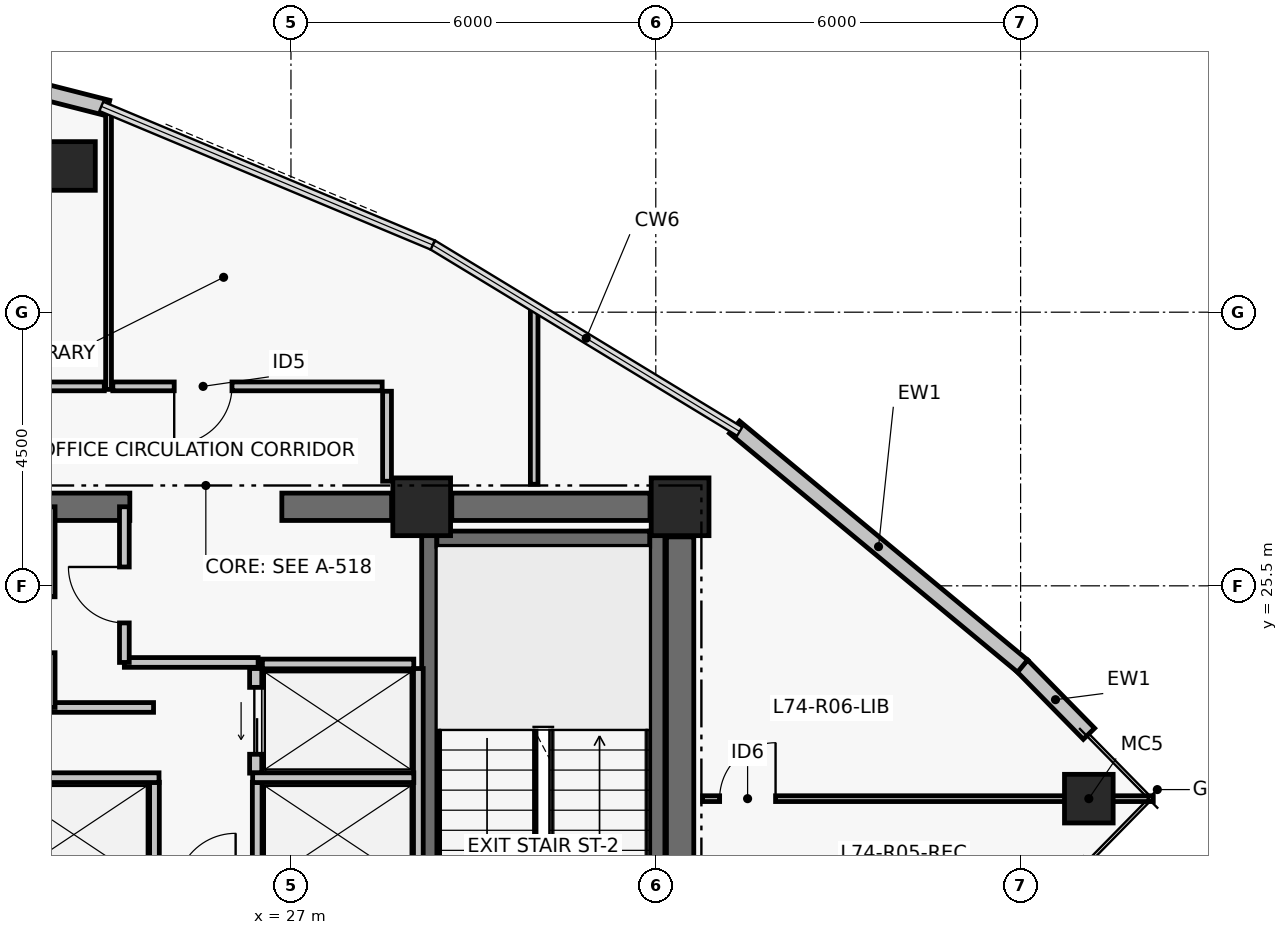
"""IFC4 building model, lengths in metres.
Left out: names, types, materials, properties, quantities, classifications, styles, units other than length and angle.
Written with IfcOpenShell. Run it as: python <this file> out.ifc"""

import sys

from ifc_helpers import new_model, si_unit, direction, frame, frame_2d, origin, origin_2d, place, context, subcontext, project, spatial, rectangle, hollow_rectangle, extrude, element, fill, save


model = new_model("IFC4")
c1 = context("Model", 3, precision=1e-05, world=origin(), true_north=direction((0.0, 1.0)))
c2 = subcontext(c1, "Body", "Model", "MODEL_VIEW")
j1 = project(units=[si_unit("LENGTHUNIT", "METRE"), si_unit("PLANEANGLEUNIT", "RADIAN")], contexts=[c1])
p1 = place(None, origin())
s1 = spatial("IfcSite", under=j1, at=p1, CompositionType="ELEMENT")
p2 = place(p1, origin())
s2 = spatial("IfcBuilding", under=s1, at=p2, CompositionType="ELEMENT")
p3 = place(p2, frame((0.0, 0.0, 291.78)))
s3 = spatial("IfcBuildingStorey", under=s2, at=p3, CompositionType="ELEMENT", Elevation=291.78)
for number, where, z_axis, x_axis in (
    (1, (29.15, 26.8, 0.0), (0.0, 0.0, 1.0), (1.0, 0.0, 0.0)),
    (2, (33.4, 26.8, 0.0), (0.0, 0.0, 1.0), (1.0, 0.0, 0.0)),
):
    element("IfcColumn", number, at=place(p3, frame(where, z_axis=z_axis, x_axis=x_axis)), inside=s3, PredefinedType="COLUMN", context=c2, shape_type="SweptSolid", body=[
        extrude(rectangle(XDim=0.95, YDim=0.95, at=origin_2d()), origin(), (0.0, 0.0, 1.0), 3.72),
    ])
p4 = place(p3, frame((22.545, 26.8, 0.0), z_axis=(0.0, 0.0, 1.0), x_axis=(1.0, 0.0, 0.0)))
e3 = element("IfcWall", 3, at=p4, inside=s3, PredefinedType="SHEAR", context=c2, shape_type="SweptSolid", body=[
    extrude(rectangle(XDim=1.805, YDim=0.45, at=frame_2d((0.903, 0.0))), origin(), (0.0, 0.0, 1.0), 3.5),
])
p5 = place(p3, frame((26.85, 26.8, 0.0), z_axis=(0.0, 0.0, 1.0), x_axis=(1.0, 0.0, 0.0)))
e4 = element("IfcWall", 4, at=p5, inside=s3, PredefinedType="SHEAR", context=c2, shape_type="SweptSolid", body=[
    extrude(rectangle(XDim=1.805, YDim=0.45, at=frame_2d((0.902, 0.0))), origin(), (0.0, 0.0, 1.0), 3.5),
])
p6 = place(p3, frame((29.645, 26.8, 0.0), z_axis=(0.0, 0.0, 1.0), x_axis=(1.0, 0.0, 0.0)))
e5 = element("IfcWall", 5, at=p6, inside=s3, PredefinedType="SHEAR", context=c2, shape_type="SweptSolid", body=[
    extrude(rectangle(XDim=3.26, YDim=0.45, at=frame_2d((1.63, 0.0))), origin(), (0.0, 0.0, 1.0), 3.5),
])
p7 = place(p3, frame((33.4, 17.695, 0.0), z_axis=(0.0, 0.0, 1.0), x_axis=(0.0, 1.0, 0.0)))
e6 = element("IfcWall", 6, at=p7, inside=s3, PredefinedType="SHEAR", context=c2, shape_type="SweptSolid", body=[
    extrude(rectangle(XDim=8.61, YDim=0.45, at=frame_2d((4.305, 0.0))), origin(), (0.0, 0.0, 1.0), 3.5),
])
p8 = place(p3, frame((29.275, 17.6, 0.0), z_axis=(0.0, 0.0, 1.0), x_axis=(0.0, 1.0, 0.0)))
e7 = element("IfcWall", 7, at=p8, inside=s3, PredefinedType="SHEAR", context=c2, shape_type="SweptSolid", body=[
    extrude(rectangle(XDim=8.8, YDim=0.25, at=frame_2d((4.4, 0.0))), origin(), (0.0, 0.0, 1.0), 3.5),
])
p9 = place(p8, frame((0.35, 0.0, 0.0)))
e8 = element("IfcOpeningElement", 8, at=p9, cuts=e7, PredefinedType="OPENING", context=c2, shape_type="SweptSolid", body=[
    extrude(rectangle(XDim=1.05, YDim=2.08, at=frame_2d((0.525, 1.04))), frame((0.0, 0.135, 0.0), z_axis=(0.0, -1.0, 0.0), x_axis=(1.0, 0.0, 0.0)), (0.0, 0.0, 1.0), 0.27),
])
p10 = place(p3, frame((33.025, 17.6, 0.0), z_axis=(0.0, 0.0, 1.0), x_axis=(0.0, 1.0, 0.0)))
e9 = element("IfcWall", 9, at=p10, inside=s3, PredefinedType="SHEAR", context=c2, shape_type="SweptSolid", body=[
    extrude(rectangle(XDim=8.8, YDim=0.25, at=frame_2d((4.4, 0.0))), origin(), (0.0, 0.0, 1.0), 3.5),
])
p11 = place(p3, frame((29.4, 26.275, 0.0), z_axis=(0.0, 0.0, 1.0), x_axis=(1.0, 0.0, 0.0)))
e10 = element("IfcWall", 10, at=p11, inside=s3, PredefinedType="SHEAR", context=c2, shape_type="SweptSolid", body=[
    extrude(rectangle(XDim=3.5, YDim=0.25, at=frame_2d((1.75, 0.0))), origin(), (0.0, 0.0, 1.0), 3.5),
])
for number, where, z_axis, x_axis in (
    (11, (40.122, 22.0, 0.0), (0.0, 0.0, 1.0), (1.0, 0.0, 0.0)),
    (12, (23.382, 32.405, 0.0), (0.0, 0.0, 1.0), (1.0, 0.0, 0.0)),
):
    element("IfcColumn", number, at=place(p3, frame(where, z_axis=z_axis, x_axis=x_axis)), inside=s3, PredefinedType="COLUMN", context=c2, shape_type="SweptSolid", body=[
        extrude(hollow_rectangle(XDim=0.8, YDim=0.8, WallThickness=0.035, at=origin_2d()), origin(), (0.0, 0.0, 1.0), 3.72),
    ])
p12 = place(p3, frame((39.024, 24.188, 0.0), z_axis=(0.0, 0.0, 1.0), x_axis=(0.700470648387, -0.71368121087, 0.0)))
e13 = element("IfcWall", 13, at=p12, inside=s3, PredefinedType="PARTITIONING", context=c2, shape_type="SweptSolid", body=[
    extrude(rectangle(XDim=1.571, YDim=0.26, at=frame_2d((0.785, 0.0))), origin(), (0.0, 0.0, 1.0), 3.5),
])
p13 = place(p3, frame((34.295, 28.108, 0.0), z_axis=(0.0, 0.0, 1.0), x_axis=(0.769779830138, -0.638309496337, 0.0)))
e14 = element("IfcWall", 14, at=p13, inside=s3, PredefinedType="PARTITIONING", context=c2, shape_type="SweptSolid", body=[
    extrude(rectangle(XDim=6.154, YDim=0.26, at=frame_2d((3.077, 0.0))), origin(), (0.0, 0.0, 1.0), 3.5),
])
p14 = place(p3, frame((18.024, 34.879, 0.0), z_axis=(0.0, 0.0, 1.0), x_axis=(0.968988278672, -0.247106689096, 0.0)))
e15 = element("IfcWall", 15, at=p14, inside=s3, PredefinedType="PARTITIONING", context=c2, shape_type="SweptSolid", body=[
    extrude(rectangle(XDim=6.154, YDim=0.26, at=frame_2d((3.077, 0.0))), origin(), (0.0, 0.0, 1.0), 3.5),
])
p15 = place(p3, frame((26.42, 22.42, 0.0), z_axis=(0.0, 0.0, 1.0), x_axis=(0.0, 1.0, 0.0)))
e16 = element("IfcWall", 16, at=p15, inside=s3, PredefinedType="PARTITIONING", context=c2, shape_type="SweptSolid", body=[
    extrude(rectangle(XDim=1.72, YDim=0.2, at=frame_2d((0.86, 0.0))), origin(), (0.0, 0.0, 1.0), 3.5),
])
p16 = place(p15, frame((0.31, 0.0, 0.0)))
e17 = element("IfcOpeningElement", 17, at=p16, cuts=e16, PredefinedType="OPENING", context=c2, shape_type="SweptSolid", body=[
    extrude(rectangle(XDim=1.1, YDim=2.08, at=frame_2d((0.55, 1.04))), frame((0.0, 0.11, 0.0), z_axis=(0.0, -1.0, 0.0), x_axis=(1.0, 0.0, 0.0)), (0.0, 0.0, 1.0), 0.22),
])
p17 = place(p3, frame((24.755, 20.56, 0.0), z_axis=(0.0, 0.0, 1.0), x_axis=(0.0, 1.0, 0.0)))
e18 = element("IfcWall", 18, at=p17, inside=s3, PredefinedType="PARTITIONING", context=c2, shape_type="SweptSolid", body=[
    extrude(rectangle(XDim=1.71, YDim=0.16, at=frame_2d((0.855, 0.0))), origin(), (0.0, 0.0, 1.0), 3.5),
])
p18 = place(p3, frame((22.18, 22.345, 0.0), z_axis=(0.0, 0.0, 1.0), x_axis=(1.0, 0.0, 0.0)))
e19 = element("IfcWall", 19, at=p18, inside=s3, PredefinedType="PARTITIONING", context=c2, shape_type="SweptSolid", body=[
    extrude(rectangle(XDim=2.65, YDim=0.16, at=frame_2d((1.325, 0.0))), origin(), (0.0, 0.0, 1.0), 3.5),
])
p19 = place(p3, frame((29.095, 20.56, 0.0), z_axis=(0.0, 0.0, 1.0), x_axis=(0.0, 1.0, 0.0)))
e20 = element("IfcWall", 20, at=p19, inside=s3, PredefinedType="PARTITIONING", context=c2, shape_type="SweptSolid", body=[
    extrude(rectangle(XDim=3.58, YDim=0.16, at=frame_2d((1.79, 0.0))), origin(), (0.0, 0.0, 1.0), 3.5),
])
p20 = place(p3, frame((26.445, 20.56, 0.0), z_axis=(0.0, 0.0, 1.0), x_axis=(0.0, 1.0, 0.0)))
e21 = element("IfcWall", 21, at=p20, inside=s3, PredefinedType="PARTITIONING", context=c2, shape_type="SweptSolid", body=[
    extrude(rectangle(XDim=1.71, YDim=0.16, at=frame_2d((0.855, 0.0))), origin(), (0.0, 0.0, 1.0), 3.5),
])
p21 = place(p3, frame((26.37, 22.345, 0.0), z_axis=(0.0, 0.0, 1.0), x_axis=(1.0, 0.0, 0.0)))
e22 = element("IfcWall", 22, at=p21, inside=s3, PredefinedType="PARTITIONING", context=c2, shape_type="SweptSolid", body=[
    extrude(rectangle(XDim=2.65, YDim=0.16, at=frame_2d((1.325, 0.0))), origin(), (0.0, 0.0, 1.0), 3.5),
])
p22 = place(p3, frame((26.53, 24.215, 0.0), z_axis=(0.0, 0.0, 1.0), x_axis=(1.0, 0.0, 0.0)))
e23 = element("IfcWall", 23, at=p22, inside=s3, PredefinedType="PARTITIONING", context=c2, shape_type="SweptSolid", body=[
    extrude(rectangle(XDim=2.49, YDim=0.16, at=frame_2d((1.245, 0.0))), origin(), (0.0, 0.0, 1.0), 3.5),
])
p23 = place(p3, frame((23.04, 23.5, 0.0), z_axis=(0.0, 0.0, 1.0), x_axis=(1.0, 0.0, 0.0)))
e24 = element("IfcWall", 24, at=p23, inside=s3, PredefinedType="PARTITIONING", context=c2, shape_type="SweptSolid", body=[
    extrude(rectangle(XDim=1.7, YDim=0.16, at=frame_2d((0.85, 0.0))), origin(), (0.0, 0.0, 1.0), 3.5),
])
p24 = place(p3, frame((23.04, 23.5, 0.0), z_axis=(0.0, 0.0, 1.0), x_axis=(0.0, 1.0, 0.0)))
e25 = element("IfcWall", 25, at=p24, inside=s3, PredefinedType="PARTITIONING", context=c2, shape_type="SweptSolid", body=[
    extrude(rectangle(XDim=3.3, YDim=0.16, at=frame_2d((1.65, 0.0))), origin(), (0.0, 0.0, 1.0), 2.63),
])
p25 = place(p24, frame((0.9, 0.0, 0.0)))
e26 = element("IfcOpeningElement", 26, at=p25, cuts=e25, PredefinedType="OPENING", context=c2, shape_type="SweptSolid", body=[
    extrude(rectangle(XDim=0.92, YDim=2.05, at=frame_2d((0.46, 1.025))), frame((0.0, 0.09, 0.0), z_axis=(0.0, -1.0, 0.0), x_axis=(1.0, 0.0, 0.0)), (0.0, 0.0, 1.0), 0.18),
])
p26 = place(p3, frame((24.26, 24.24, 0.0), z_axis=(0.0, 0.0, 1.0), x_axis=(1.0, 0.0, 0.0)))
e27 = element("IfcWall", 27, at=p26, inside=s3, PredefinedType="PARTITIONING", context=c2, shape_type="SweptSolid", body=[
    extrude(rectangle(XDim=2.2, YDim=0.16, at=frame_2d((1.1, 0.0))), origin(), (0.0, 0.0, 1.0), 3.5),
])
p27 = place(p3, frame((24.26, 24.24, 0.0), z_axis=(0.0, 0.0, 1.0), x_axis=(0.0, 1.0, 0.0)))
e28 = element("IfcWall", 28, at=p27, inside=s3, PredefinedType="PARTITIONING", context=c2, shape_type="SweptSolid", body=[
    extrude(rectangle(XDim=2.56, YDim=0.16, at=frame_2d((1.28, 0.0))), origin(), (0.0, 0.0, 1.0), 2.63),
])
p28 = place(p27, frame((0.65, 0.0, 0.0)))
e29 = element("IfcOpeningElement", 29, at=p28, cuts=e28, PredefinedType="OPENING", context=c2, shape_type="SweptSolid", body=[
    extrude(rectangle(XDim=0.92, YDim=2.05, at=frame_2d((0.46, 1.025))), frame((0.0, 0.09, 0.0), z_axis=(0.0, -1.0, 0.0), x_axis=(1.0, 0.0, 0.0)), (0.0, 0.0, 1.0), 0.18),
])
p29 = place(p3, frame((28.58, 27.22, 0.0), z_axis=(0.0, 0.0, 1.0), x_axis=(0.0, 1.0, 0.0)))
e30 = element("IfcWall", 30, at=p29, inside=s3, PredefinedType="PARTITIONING", context=c2, shape_type="SweptSolid", body=[
    extrude(rectangle(XDim=1.48, YDim=0.145, at=frame_2d((0.74, 0.0))), origin(), (0.0, 0.0, 1.0), 2.63),
])
p30 = place(p3, frame((28.5, 28.78, 0.0), z_axis=(0.0, 0.0, 1.0), x_axis=(-1.0, 0.0, 0.0)))
e31 = element("IfcWall", 31, at=p30, inside=s3, PredefinedType="PARTITIONING", context=c2, shape_type="SweptSolid", body=[
    extrude(rectangle(XDim=4.43, YDim=0.145, at=frame_2d((2.215, 0.0))), origin(), (0.0, 0.0, 1.0), 3.5),
])
p31 = place(p30, frame((2.47, 0.0, 0.0)))
e32 = element("IfcOpeningElement", 32, at=p31, cuts=e31, PredefinedType="OPENING", context=c2, shape_type="SweptSolid", body=[
    extrude(rectangle(XDim=0.95, YDim=2.06, at=frame_2d((0.475, 1.03))), frame((0.0, 0.083, 0.0), z_axis=(0.0, -1.0, 0.0), x_axis=(1.0, 0.0, 0.0)), (0.0, 0.0, 1.0), 0.165),
])
p32 = place(p3, frame((23.93, 28.78, 0.0), z_axis=(0.0, 0.0, 1.0), x_axis=(-1.0, 0.0, 0.0)))
e33 = element("IfcWall", 33, at=p32, inside=s3, PredefinedType="PARTITIONING", context=c2, shape_type="SweptSolid", body=[
    extrude(rectangle(XDim=6.39, YDim=0.145, at=frame_2d((3.195, 0.0))), origin(), (0.0, 0.0, 1.0), 2.83),
])
p33 = place(p3, frame((24.0, 28.73, 0.0), z_axis=(0.0, 0.0, 1.0), x_axis=(0.0, 1.0, 0.0)))
e34 = element("IfcWall", 34, at=p33, inside=s3, PredefinedType="PARTITIONING", context=c2, shape_type="SweptSolid", body=[
    extrude(rectangle(XDim=4.616, YDim=0.095, at=frame_2d((2.308, 0.0))), origin(), (0.0, 0.0, 1.0), 2.98),
])
p34 = place(p3, frame((31.0, 27.17, 0.0), z_axis=(0.0, 0.0, 1.0), x_axis=(0.0, 1.0, 0.0)))
e35 = element("IfcWall", 35, at=p34, inside=s3, PredefinedType="PARTITIONING", context=c2, shape_type="SweptSolid", body=[
    extrude(rectangle(XDim=2.933, YDim=0.125, at=frame_2d((1.467, 0.0))), origin(), (0.0, 0.0, 1.0), 2.63),
])
p35 = place(p3, frame((33.77, 22.0, 0.0), z_axis=(0.0, 0.0, 1.0), x_axis=(1.0, 0.0, 0.0)))
e36 = element("IfcWall", 36, at=p35, inside=s3, PredefinedType="PARTITIONING", context=c2, shape_type="SweptSolid", body=[
    extrude(rectangle(XDim=7.412, YDim=0.095, at=frame_2d((3.706, 0.0))), origin(), (0.0, 0.0, 1.0), 2.63),
])
p36 = place(p35, frame((0.28, 0.0, 0.0)))
e37 = element("IfcOpeningElement", 37, at=p36, cuts=e36, PredefinedType="OPENING", context=c2, shape_type="SweptSolid", body=[
    extrude(rectangle(XDim=0.92, YDim=2.05, at=frame_2d((0.46, 1.025))), frame((0.0, 0.057, 0.0), z_axis=(0.0, -1.0, 0.0), x_axis=(1.0, 0.0, 0.0)), (0.0, 0.0, 1.0), 0.115),
])
p37 = place(p16, origin())
e38 = element("IfcDoor", 38, at=p37, inside=s3, OperationType="DOUBLE_DOOR_SLIDING", PredefinedType="DOOR", context=c2, shape_type="SweptSolid", body=[
    extrude(rectangle(XDim=1.1, YDim=2.08, at=frame_2d((0.55, 1.04))), frame((0.0, 0.025, 0.0), z_axis=(0.0, -1.0, 0.0), x_axis=(1.0, 0.0, 0.0)), (0.0, 0.0, 1.0), 0.05),
])
fill(e17, e38)
p38 = place(p28, origin())
e39 = element("IfcDoor", 39, at=p38, inside=s3, OperationType="SINGLE_SWING_RIGHT", PredefinedType="DOOR", context=c2, shape_type="SweptSolid", body=[
    extrude(rectangle(XDim=0.92, YDim=2.05, at=frame_2d((0.46, 1.025))), frame((0.0, 0.025, 0.0), z_axis=(0.0, -1.0, 0.0), x_axis=(1.0, 0.0, 0.0)), (0.0, 0.0, 1.0), 0.05),
])
fill(e29, e39)
p39 = place(p31, origin())
e40 = element("IfcDoor", 40, at=p39, inside=s3, OperationType="SINGLE_SWING_RIGHT", PredefinedType="DOOR", context=c2, shape_type="SweptSolid", body=[
    extrude(rectangle(XDim=0.95, YDim=2.06, at=frame_2d((0.475, 1.03))), frame((0.0, 0.025, 0.0), z_axis=(0.0, -1.0, 0.0), x_axis=(1.0, 0.0, 0.0)), (0.0, 0.0, 1.0), 0.05),
])
fill(e32, e40)
p40 = place(p36, origin())
e41 = element("IfcDoor", 41, at=p40, inside=s3, OperationType="SINGLE_SWING_RIGHT", PredefinedType="DOOR", context=c2, shape_type="SweptSolid", body=[
    extrude(rectangle(XDim=0.92, YDim=2.05, at=frame_2d((0.46, 1.025))), frame((0.0, 0.025, 0.0), z_axis=(0.0, -1.0, 0.0), x_axis=(1.0, 0.0, 0.0)), (0.0, 0.0, 1.0), 0.05),
])
fill(e37, e41)
save(model, sys.argv[1])
